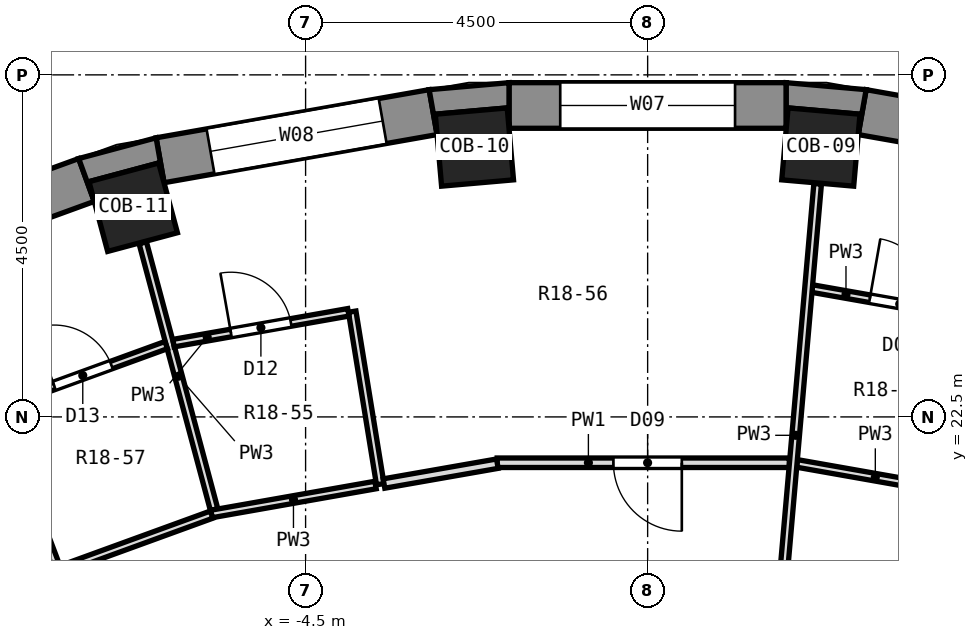
"""IFC4 building model, lengths in metres.
Left out: names, types, materials, properties, quantities, classifications, styles, units other than length and angle.
Written with IfcOpenShell. Run it as: python <this file> out.ifc"""

import sys

from ifc_helpers import new_model, si_unit, direction, frame, frame_2d, origin, origin_2d, place, context, subcontext, project, spatial, polyline, rectangle, outline, extrude, element, fill, save


model = new_model("IFC4")
c1 = context("Model", 3, precision=1e-05, world=origin(), true_north=direction((0.0, 1.0)))
c2 = subcontext(c1, "Body", "Model", "MODEL_VIEW")
j1 = project(units=[si_unit("LENGTHUNIT", "METRE"), si_unit("PLANEANGLEUNIT", "RADIAN")], contexts=[c1])
p1 = place(None, origin())
s1 = spatial("IfcSite", under=j1, at=p1, CompositionType="ELEMENT")
p2 = place(p1, origin())
s2 = spatial("IfcBuilding", under=s1, at=p2, CompositionType="ELEMENT")
p3 = place(p2, frame((0.0, 0.0, 101.8)))
s3 = spatial("IfcBuildingStorey", under=s2, at=p3, CompositionType="ELEMENT", Elevation=101.8)
for number, where, z_axis, x_axis in (
    (1, (2.279, 26.051, 0.0), (0.0, 0.0, 1.0), (0.087, 0.996, 0.0)),
    (2, (-2.279, 26.051, 0.0), (0.0, 0.0, 1.0), (-0.087, 0.996, 0.0)),
    (3, (-6.768, 25.259, 0.0), (0.0, 0.0, 1.0), (-0.259, 0.966, 0.0)),
):
    element("IfcColumn", number, at=place(p3, frame(where, z_axis=z_axis, x_axis=x_axis)), inside=s3, PredefinedType="COLUMN", context=c2, shape_type="SweptSolid", body=[
        extrude(rectangle(XDim=0.95, YDim=0.95, at=origin_2d()), origin(), (0.0, 0.0, 1.0), 3.3),
    ])
p4 = place(p3, frame((6.415, 25.876, 0.0), z_axis=(0.0, 0.0, 1.0), x_axis=(-0.984803764455, 0.173670796382, 0.0)))
e4 = element("IfcWall", 4, at=p4, inside=s3, PredefinedType="SOLIDWALL", context=c2, shape_type="SweptSolid", body=[
    extrude(rectangle(XDim=3.648, YDim=0.6, at=frame_2d((1.824, 0.0))), origin(), (0.0, 0.0, 1.0), 2.8),
])
p5 = place(p4, frame((0.674, 0.0, 0.9)))
e5 = element("IfcOpeningElement", 5, at=p5, cuts=e4, PredefinedType="OPENING", context=c2, shape_type="SweptSolid", body=[
    extrude(rectangle(XDim=2.3, YDim=1.8, at=frame_2d((1.15, 0.9))), frame((0.0, 0.312, 0.0), z_axis=(0.0, -1.0, 0.0), x_axis=(1.0, 0.0, 0.0)), (0.0, 0.0, 1.0), 0.624),
])
p6 = place(p3, frame((1.824, 26.597, 0.0), z_axis=(0.0, 0.0, 1.0), x_axis=(-1.0, 0.0, 0.0)))
e6 = element("IfcWall", 6, at=p6, inside=s3, PredefinedType="SOLIDWALL", context=c2, shape_type="SweptSolid", body=[
    extrude(rectangle(XDim=3.648, YDim=0.6, at=frame_2d((1.824, 0.0))), origin(), (0.0, 0.0, 1.0), 2.8),
])
p7 = place(p6, frame((0.674, 0.0, 0.9)))
e7 = element("IfcOpeningElement", 7, at=p7, cuts=e6, PredefinedType="OPENING", context=c2, shape_type="SweptSolid", body=[
    extrude(rectangle(XDim=2.3, YDim=1.8, at=frame_2d((1.15, 0.9))), frame((0.0, 0.312, 0.0), z_axis=(0.0, -1.0, 0.0), x_axis=(1.0, 0.0, 0.0)), (0.0, 0.0, 1.0), 0.624),
])
p8 = place(p3, frame((-2.822, 26.51, 0.0), z_axis=(0.0, 0.0, 1.0), x_axis=(-0.984803764455, -0.173670796382, 0.0)))
e8 = element("IfcWall", 8, at=p8, inside=s3, PredefinedType="SOLIDWALL", context=c2, shape_type="SweptSolid", body=[
    extrude(rectangle(XDim=3.648, YDim=0.6, at=frame_2d((1.824, 0.0))), origin(), (0.0, 0.0, 1.0), 2.8),
])
p9 = place(p8, frame((0.674, 0.0, 0.9)))
e9 = element("IfcOpeningElement", 9, at=p9, cuts=e8, PredefinedType="OPENING", context=c2, shape_type="SweptSolid", body=[
    extrude(rectangle(XDim=2.3, YDim=1.8, at=frame_2d((1.15, 0.9))), frame((0.0, 0.312, 0.0), z_axis=(0.0, -1.0, 0.0), x_axis=(1.0, 0.0, 0.0)), (0.0, 0.0, 1.0), 0.624),
])
p10 = place(p3, frame((-7.383, 25.617, 0.0), z_axis=(0.0, 0.0, 1.0), x_axis=(-0.939703505393, -0.341990236633, 0.0)))
e10 = element("IfcWall", 10, at=p10, inside=s3, PredefinedType="SOLIDWALL", context=c2, shape_type="SweptSolid", body=[
    extrude(rectangle(XDim=3.648, YDim=0.6, at=frame_2d((1.824, 0.0))), origin(), (0.0, 0.0, 1.0), 2.8),
])
p11 = place(p10, frame((0.674, 0.0, 0.9)))
e11 = element("IfcOpeningElement", 11, at=p11, cuts=e10, PredefinedType="OPENING", context=c2, shape_type="SweptSolid", body=[
    extrude(rectangle(XDim=2.3, YDim=1.8, at=frame_2d((1.15, 0.9))), frame((0.0, 0.312, 0.0), z_axis=(0.0, -1.0, 0.0), x_axis=(1.0, 0.0, 0.0)), (0.0, 0.0, 1.0), 0.624),
])
p12 = place(p3, origin())
e12 = element("IfcWall", 12, at=p12, inside=s3, PredefinedType="SOLIDWALL", context=c2, shape_type="SweptSolid", body=[
    extrude(outline(polyline([(2.875, 26.805), (1.824, 26.897), (1.824, 26.297), (1.847, 26.565), (2.794, 26.482), (2.77, 26.215), (2.875, 26.805)])), origin(), (0.0, 0.0, 1.0), 2.8),
])
p13 = place(p3, origin())
e13 = element("IfcWall", 13, at=p13, inside=s3, PredefinedType="SOLIDWALL", context=c2, shape_type="SweptSolid", body=[
    extrude(outline(polyline([(-2.875, 26.805), (-2.77, 26.215), (-2.794, 26.482), (-1.847, 26.565), (-1.824, 26.297), (-1.824, 26.897), (-2.875, 26.805)])), origin(), (0.0, 0.0, 1.0), 2.8),
])
p14 = place(p3, origin())
e14 = element("IfcWall", 14, at=p14, inside=s3, PredefinedType="SOLIDWALL", context=c2, shape_type="SweptSolid", body=[
    extrude(outline(polyline([(-6.467, 26.172), (-7.486, 25.899), (-7.28, 25.335), (-7.35, 25.595), (-6.432, 25.841), (-6.363, 25.581), (-6.467, 26.172)])), origin(), (0.0, 0.0, 1.0), 2.8),
])
p15 = place(p3, frame((-3.887, 23.885, 0.0), z_axis=(0.0, 0.0, 1.0), x_axis=(0.160403826344, -0.987051474085, 0.0)))
e15 = element("IfcWall", 15, at=p15, inside=s3, PredefinedType="PARTITIONING", context=c2, shape_type="SweptSolid", body=[
    extrude(rectangle(XDim=2.3, YDim=0.1, at=frame_2d((1.15, 0.0))), origin(), (0.0, 0.0, 1.0), 2.8),
])
p16 = place(p3, frame((-6.642, 24.791, 0.0), z_axis=(0.0, 0.0, 1.0), x_axis=(0.258373404153, -0.966045125254, 0.0)))
e16 = element("IfcWall", 16, at=p16, inside=s3, PredefinedType="PARTITIONING", context=c2, shape_type="SweptSolid", body=[
    extrude(rectangle(XDim=3.634, YDim=0.1, at=frame_2d((1.817, 0.0))), origin(), (0.0, 0.0, 1.0), 2.8),
])
p17 = place(p3, frame((-8.576, 22.629, 0.0), z_axis=(0.0, 0.0, 1.0), x_axis=(0.354308635081, -0.935128542558, 0.0)))
e17 = element("IfcWall", 17, at=p17, inside=s3, PredefinedType="PARTITIONING", context=c2, shape_type="SweptSolid", body=[
    extrude(rectangle(XDim=2.3, YDim=0.1, at=frame_2d((1.15, 0.0))), origin(), (0.0, 0.0, 1.0), 2.8),
])
p18 = place(p3, frame((1.965, 21.888, 0.0), z_axis=(0.0, 0.0, 1.0), x_axis=(0.984784733711, -0.173778676048, 0.0)))
e18 = element("IfcWall", 18, at=p18, inside=s3, PredefinedType="PARTITIONING", context=c2, shape_type="SweptSolid", body=[
    extrude(rectangle(XDim=2.092, YDim=0.1, at=frame_2d((1.046, 0.0))), origin(), (0.0, 0.0, 1.0), 2.8),
])
p19 = place(p3, frame((2.166, 24.188, 0.0), z_axis=(0.0, 0.0, 1.0), x_axis=(0.984810328334, -0.173633571655, 0.0)))
e19 = element("IfcWall", 19, at=p19, inside=s3, PredefinedType="PARTITIONING", context=c2, shape_type="SweptSolid", body=[
    extrude(rectangle(XDim=2.386, YDim=0.1, at=frame_2d((1.193, 0.0))), origin(), (0.0, 0.0, 1.0), 2.8),
])
p20 = place(p19, frame((0.768, 0.0, 0.0)))
e20 = element("IfcOpeningElement", 20, at=p20, cuts=e19, PredefinedType="OPENING", context=c2, shape_type="SweptSolid", body=[
    extrude(rectangle(XDim=0.8, YDim=2.1, at=frame_2d((0.4, 1.05))), frame((0.0, 0.062, 0.0), z_axis=(0.0, -1.0, 0.0), x_axis=(1.0, 0.0, 0.0)), (0.0, 0.0, 1.0), 0.124),
])
p21 = place(p3, frame((-1.979, 21.897, 0.0), z_axis=(0.0, 0.0, 1.0), x_axis=(1.0, 0.0, 0.0)))
e21 = element("IfcWall", 21, at=p21, inside=s3, PredefinedType="PARTITIONING", context=c2, shape_type="SweptSolid", body=[
    extrude(rectangle(XDim=3.844, YDim=0.125, at=frame_2d((1.922, 0.0))), origin(), (0.0, 0.0, 1.0), 2.8),
])
p22 = place(p21, frame((1.529, 0.0, 0.0)))
e22 = element("IfcOpeningElement", 22, at=p22, cuts=e21, PredefinedType="OPENING", context=c2, shape_type="SweptSolid", body=[
    extrude(rectangle(XDim=0.9, YDim=2.1, at=frame_2d((0.45, 1.05))), frame((0.0, 0.074, 0.0), z_axis=(0.0, -1.0, 0.0), x_axis=(1.0, 0.0, 0.0)), (0.0, 0.0, 1.0), 0.149),
])
p23 = place(p3, frame((-3.469, 21.624, 0.0), z_axis=(0.0, 0.0, 1.0), x_axis=(0.984977719449, 0.172681476106, 0.0)))
e23 = element("IfcWall", 23, at=p23, inside=s3, PredefinedType="PARTITIONING", context=c2, shape_type="SweptSolid", body=[
    extrude(rectangle(XDim=1.514, YDim=0.125, at=frame_2d((0.757, 0.0))), origin(), (0.0, 0.0, 1.0), 2.8),
])
p24 = place(p3, frame((-5.739, 21.223, 0.0), z_axis=(0.0, 0.0, 1.0), x_axis=(0.984781317039, 0.173798036845, 0.0)))
e24 = element("IfcWall", 24, at=p24, inside=s3, PredefinedType="PARTITIONING", context=c2, shape_type="SweptSolid", body=[
    extrude(rectangle(XDim=2.193, YDim=0.1, at=frame_2d((1.096, 0.0))), origin(), (0.0, 0.0, 1.0), 2.8),
])
p25 = place(p3, frame((-6.238, 23.471, 0.0), z_axis=(0.0, 0.0, 1.0), x_axis=(0.984817208654, 0.173594543518, 0.0)))
e25 = element("IfcWall", 25, at=p25, inside=s3, PredefinedType="PARTITIONING", context=c2, shape_type="SweptSolid", body=[
    extrude(rectangle(XDim=2.336, YDim=0.1, at=frame_2d((1.168, 0.0))), origin(), (0.0, 0.0, 1.0), 2.8),
])
p26 = place(p25, frame((0.768, 0.0, 0.0)))
e26 = element("IfcOpeningElement", 26, at=p26, cuts=e25, PredefinedType="OPENING", context=c2, shape_type="SweptSolid", body=[
    extrude(rectangle(XDim=0.8, YDim=2.1, at=frame_2d((0.4, 1.05))), frame((0.0, 0.062, 0.0), z_axis=(0.0, -1.0, 0.0), x_axis=(1.0, 0.0, 0.0)), (0.0, 0.0, 1.0), 0.124),
])
p27 = place(p3, frame((-7.714, 20.495, 0.0), z_axis=(0.0, 0.0, 1.0), x_axis=(0.939725675468, 0.341929312674, 0.0)))
e27 = element("IfcWall", 27, at=p27, inside=s3, PredefinedType="PARTITIONING", context=c2, shape_type="SweptSolid", body=[
    extrude(rectangle(XDim=2.105, YDim=0.1, at=frame_2d((1.052, 0.0))), origin(), (0.0, 0.0, 1.0), 2.8),
])
p28 = place(p3, frame((-8.529, 22.646, 0.0), z_axis=(0.0, 0.0, 1.0), x_axis=(0.939707949959, 0.341978023831, 0.0)))
e28 = element("IfcWall", 28, at=p28, inside=s3, PredefinedType="PARTITIONING", context=c2, shape_type="SweptSolid", body=[
    extrude(rectangle(XDim=2.336, YDim=0.1, at=frame_2d((1.168, 0.0))), origin(), (0.0, 0.0, 1.0), 2.8),
])
p29 = place(p28, frame((0.768, 0.0, 0.0)))
e29 = element("IfcOpeningElement", 29, at=p29, cuts=e28, PredefinedType="OPENING", context=c2, shape_type="SweptSolid", body=[
    extrude(rectangle(XDim=0.8, YDim=2.1, at=frame_2d((0.4, 1.05))), frame((0.0, 0.062, 0.0), z_axis=(0.0, -1.0, 0.0), x_axis=(1.0, 0.0, 0.0)), (0.0, 0.0, 1.0), 0.124),
])
p30 = place(p3, frame((1.658, 18.949, 0.0), z_axis=(0.0, 0.0, 1.0), x_axis=(0.087052988713, 0.996203682565, 0.0)))
e30 = element("IfcWall", 30, at=p30, inside=s3, PredefinedType="PARTITIONING", context=c2, shape_type="SweptSolid", body=[
    extrude(rectangle(XDim=6.644, YDim=0.1, at=frame_2d((3.322, 0.0))), origin(), (0.0, 0.0, 1.0), 2.8),
])
p31 = place(p7, origin())
e31 = element("IfcWindow", 31, at=p31, inside=s3, PartitioningType="SINGLE_PANEL", PredefinedType="WINDOW", context=c2, shape_type="SweptSolid", body=[
    extrude(rectangle(XDim=2.3, YDim=1.8, at=frame_2d((1.15, 0.9))), frame((0.0, 0.18, 0.0), z_axis=(0.0, -1.0, 0.0), x_axis=(1.0, 0.0, 0.0)), (0.0, 0.0, 1.0), 0.06),
])
fill(e7, e31)
p32 = place(p9, origin())
e32 = element("IfcWindow", 32, at=p32, inside=s3, PartitioningType="SINGLE_PANEL", PredefinedType="WINDOW", context=c2, shape_type="SweptSolid", body=[
    extrude(rectangle(XDim=2.3, YDim=1.8, at=frame_2d((1.15, 0.9))), frame((0.0, 0.18, 0.0), z_axis=(0.0, -1.0, 0.0), x_axis=(1.0, 0.0, 0.0)), (0.0, 0.0, 1.0), 0.06),
])
fill(e9, e32)
p33 = place(p20, origin())
e33 = element("IfcDoor", 33, at=p33, inside=s3, OperationType="SINGLE_SWING_LEFT", PredefinedType="DOOR", context=c2, shape_type="SweptSolid", body=[
    extrude(rectangle(XDim=0.8, YDim=2.1, at=frame_2d((0.4, 1.05))), frame((0.0, 0.025, 0.0), z_axis=(0.0, -1.0, 0.0), x_axis=(1.0, 0.0, 0.0)), (0.0, 0.0, 1.0), 0.05),
])
fill(e20, e33)
p34 = place(p22, frame((0.9, 0.0, 0.0), z_axis=(0.0, 0.0, 1.0), x_axis=(-1.0, 0.0, 0.0)))
e34 = element("IfcDoor", 34, at=p34, inside=s3, OperationType="SINGLE_SWING_LEFT", PredefinedType="DOOR", context=c2, shape_type="SweptSolid", body=[
    extrude(rectangle(XDim=0.9, YDim=2.1, at=frame_2d((0.45, 1.05))), frame((0.0, 0.025, 0.0), z_axis=(0.0, -1.0, 0.0), x_axis=(1.0, 0.0, 0.0)), (0.0, 0.0, 1.0), 0.05),
])
fill(e22, e34)
p35 = place(p26, origin())
e35 = element("IfcDoor", 35, at=p35, inside=s3, OperationType="SINGLE_SWING_LEFT", PredefinedType="DOOR", context=c2, shape_type="SweptSolid", body=[
    extrude(rectangle(XDim=0.8, YDim=2.1, at=frame_2d((0.4, 1.05))), frame((0.0, 0.025, 0.0), z_axis=(0.0, -1.0, 0.0), x_axis=(1.0, 0.0, 0.0)), (0.0, 0.0, 1.0), 0.05),
])
fill(e26, e35)
p36 = place(p29, origin())
e36 = element("IfcDoor", 36, at=p36, inside=s3, OperationType="SINGLE_SWING_LEFT", PredefinedType="DOOR", context=c2, shape_type="SweptSolid", body=[
    extrude(rectangle(XDim=0.8, YDim=2.1, at=frame_2d((0.4, 1.05))), frame((0.0, 0.025, 0.0), z_axis=(0.0, -1.0, 0.0), x_axis=(1.0, 0.0, 0.0)), (0.0, 0.0, 1.0), 0.05),
])
fill(e29, e36)
save(model, sys.argv[1])
